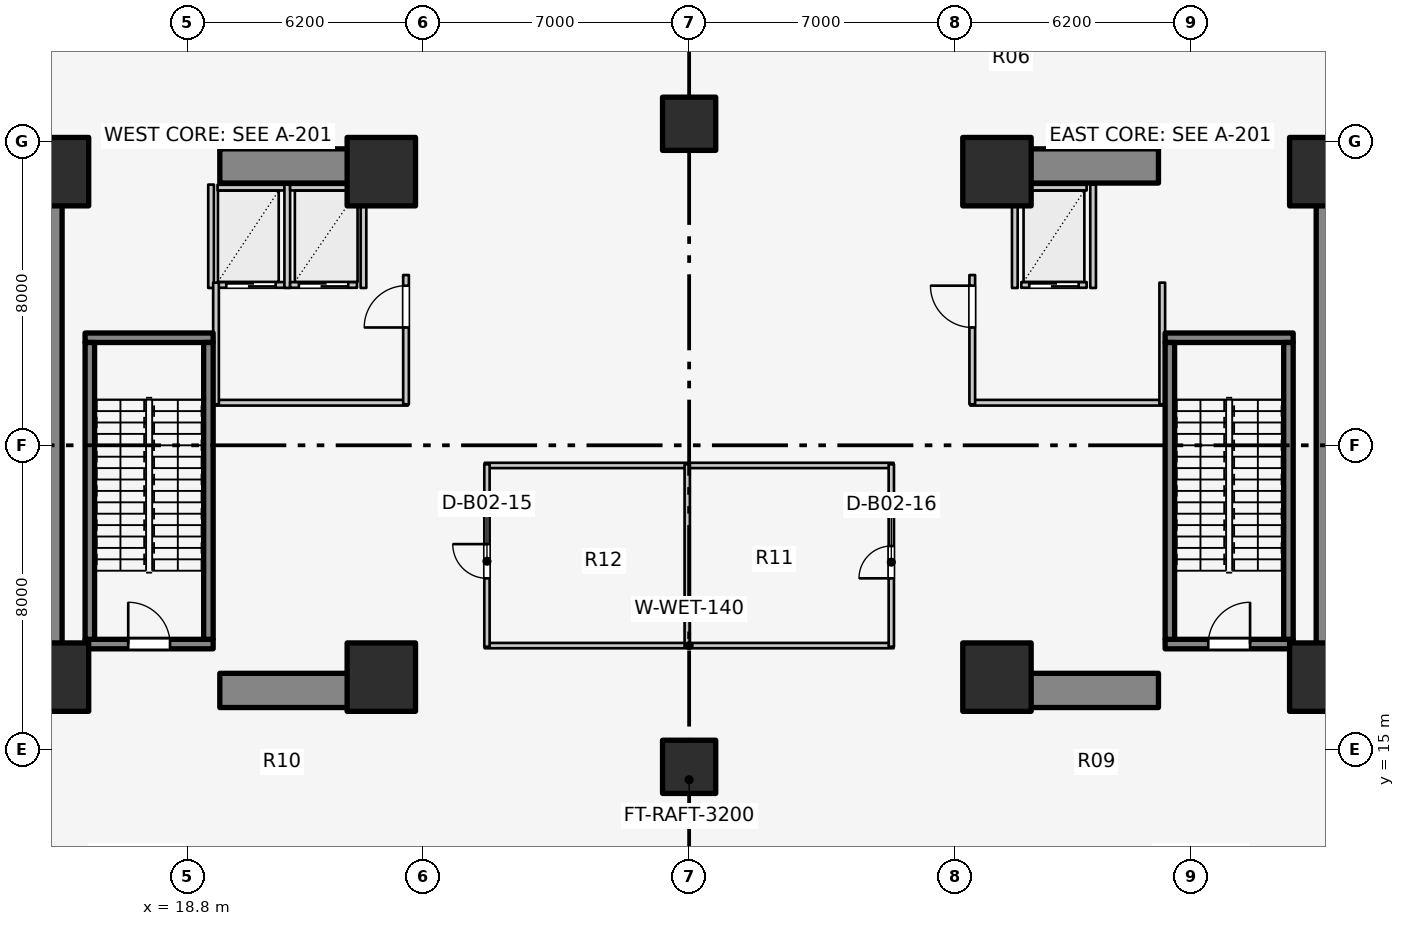
"""IFC4 building model, lengths in metres.
Left out: names, types, materials, properties, quantities, classifications, styles, units other than length and angle.
Written with IfcOpenShell. Run it as: python <this file> out.ifc"""

import sys

from ifc_helpers import new_model, si_unit, direction, frame, frame_2d, origin, origin_2d, place, context, subcontext, project, spatial, rectangle, extrude, element, fill, save


model = new_model("IFC4")
c1 = context("Model", 3, precision=1e-05, world=origin(), true_north=direction((0.0, 1.0)))
c2 = subcontext(c1, "Body", "Model", "MODEL_VIEW")
j1 = project(units=[si_unit("LENGTHUNIT", "METRE"), si_unit("PLANEANGLEUNIT", "RADIAN")], contexts=[c1])
p1 = place(None, origin())
s1 = spatial("IfcSite", under=j1, at=p1, CompositionType="ELEMENT")
p2 = place(p1, origin())
s2 = spatial("IfcBuilding", under=s1, at=p2, CompositionType="ELEMENT")
p3 = place(p2, frame((0.0, 0.0, -10.8)))
s3 = spatial("IfcBuildingStorey", under=s2, at=p3, CompositionType="ELEMENT", Elevation=-10.8)
p4 = place(p3, frame((15.05, 17.05, 0.0), z_axis=(0.0, 0.0, 1.0), x_axis=(0.0, 1.0, 0.0)))
e1 = element("IfcWall", 1, at=p4, inside=s3, PredefinedType="SHEAR", context=c2, shape_type="SweptSolid", body=[
    extrude(rectangle(XDim=12.8, YDim=0.9, at=frame_2d((6.4, 0.0))), origin(), (0.0, 0.0, 1.0), 5.4),
])
for number, where, z_axis, x_axis in (
    (2, (19.65, 16.55, 0.0), (0.0, 0.0, 1.0), (1.0, 0.0, 0.0)),
    (3, (19.65, 30.35, 0.0), (0.0, 0.0, 1.0), (1.0, 0.0, 0.0)),
):
    element("IfcWall", number, at=place(p3, frame(where, z_axis=z_axis, x_axis=x_axis)), inside=s3, PredefinedType="SHEAR", context=c2, shape_type="SweptSolid", body=[
        extrude(rectangle(XDim=4.5, YDim=0.9, at=frame_2d((2.25, 0.0))), origin(), (0.0, 0.0, 1.0), 5.4),
    ])
p5 = place(p3, frame((48.95, 17.05, 0.0), z_axis=(0.0, 0.0, 1.0), x_axis=(0.0, 1.0, 0.0)))
e4 = element("IfcWall", 4, at=p5, inside=s3, PredefinedType="SHEAR", context=c2, shape_type="SweptSolid", body=[
    extrude(rectangle(XDim=12.8, YDim=0.9, at=frame_2d((6.4, 0.0))), origin(), (0.0, 0.0, 1.0), 5.4),
])
for number, where, z_axis, x_axis in (
    (5, (39.85, 16.55, 0.0), (0.0, 0.0, 1.0), (1.0, 0.0, 0.0)),
    (6, (39.85, 30.35, 0.0), (0.0, 0.0, 1.0), (1.0, 0.0, 0.0)),
):
    element("IfcWall", number, at=place(p3, frame(where, z_axis=z_axis, x_axis=x_axis)), inside=s3, PredefinedType="SHEAR", context=c2, shape_type="SweptSolid", body=[
        extrude(rectangle(XDim=4.5, YDim=0.9, at=frame_2d((2.25, 0.0))), origin(), (0.0, 0.0, 1.0), 5.4),
    ])
p6 = place(p3, frame((16.105, 17.77, 0.0), z_axis=(0.0, 0.0, 1.0), x_axis=(1.0, 0.0, 0.0)))
e7 = element("IfcWall", 7, at=p6, inside=s3, PredefinedType="SOLIDWALL", context=c2, shape_type="SweptSolid", body=[
    extrude(rectangle(XDim=3.37, YDim=0.25, at=frame_2d((1.685, 0.0))), origin(), (0.0, 0.0, 1.0), 5.4),
])
p7 = place(p6, frame((1.135, 0.0, 0.0)))
e8 = element("IfcOpeningElement", 8, at=p7, cuts=e7, PredefinedType="OPENING", context=c2, shape_type="SweptSolid", body=[
    extrude(rectangle(XDim=1.1, YDim=2.1, at=frame_2d((0.55, 1.05))), frame((0.0, 0.135, 0.0), z_axis=(0.0, -1.0, 0.0), x_axis=(1.0, 0.0, 0.0)), (0.0, 0.0, 1.0), 0.27),
])
p8 = place(p3, frame((16.105, 25.83, 0.0), z_axis=(0.0, 0.0, 1.0), x_axis=(1.0, 0.0, 0.0)))
e9 = element("IfcWall", 9, at=p8, inside=s3, PredefinedType="SOLIDWALL", context=c2, shape_type="SweptSolid", body=[
    extrude(rectangle(XDim=3.37, YDim=0.25, at=frame_2d((1.685, 0.0))), origin(), (0.0, 0.0, 1.0), 5.4),
])
for number, where, z_axis, x_axis in (
    (10, (16.23, 17.895, 0.0), (0.0, 0.0, 1.0), (0.0, 1.0, 0.0)),
    (11, (19.35, 17.895, 0.0), (0.0, 0.0, 1.0), (0.0, 1.0, 0.0)),
):
    element("IfcWall", number, at=place(p3, frame(where, z_axis=z_axis, x_axis=x_axis)), inside=s3, PredefinedType="SOLIDWALL", context=c2, shape_type="SweptSolid", body=[
        extrude(rectangle(XDim=7.81, YDim=0.25, at=frame_2d((3.905, 0.0))), origin(), (0.0, 0.0, 1.0), 5.4),
    ])
p9 = place(p3, frame((44.525, 17.77, 0.0), z_axis=(0.0, 0.0, 1.0), x_axis=(1.0, 0.0, 0.0)))
e12 = element("IfcWall", 12, at=p9, inside=s3, PredefinedType="SOLIDWALL", context=c2, shape_type="SweptSolid", body=[
    extrude(rectangle(XDim=3.37, YDim=0.25, at=frame_2d((1.685, 0.0))), origin(), (0.0, 0.0, 1.0), 5.4),
])
p10 = place(p9, frame((1.135, 0.0, 0.0)))
e13 = element("IfcOpeningElement", 13, at=p10, cuts=e12, PredefinedType="OPENING", context=c2, shape_type="SweptSolid", body=[
    extrude(rectangle(XDim=1.1, YDim=2.1, at=frame_2d((0.55, 1.05))), frame((0.0, 0.135, 0.0), z_axis=(0.0, -1.0, 0.0), x_axis=(1.0, 0.0, 0.0)), (0.0, 0.0, 1.0), 0.27),
])
p11 = place(p3, frame((44.525, 25.83, 0.0), z_axis=(0.0, 0.0, 1.0), x_axis=(1.0, 0.0, 0.0)))
e14 = element("IfcWall", 14, at=p11, inside=s3, PredefinedType="SOLIDWALL", context=c2, shape_type="SweptSolid", body=[
    extrude(rectangle(XDim=3.37, YDim=0.25, at=frame_2d((1.685, 0.0))), origin(), (0.0, 0.0, 1.0), 5.4),
])
for number, where, z_axis, x_axis in (
    (15, (44.65, 17.895, 0.0), (0.0, 0.0, 1.0), (0.0, 1.0, 0.0)),
    (16, (47.77, 17.895, 0.0), (0.0, 0.0, 1.0), (0.0, 1.0, 0.0)),
):
    element("IfcWall", number, at=place(p3, frame(where, z_axis=z_axis, x_axis=x_axis)), inside=s3, PredefinedType="SOLIDWALL", context=c2, shape_type="SweptSolid", body=[
        extrude(rectangle(XDim=7.81, YDim=0.25, at=frame_2d((3.905, 0.0))), origin(), (0.0, 0.0, 1.0), 5.4),
    ])
for number, where, z_axis, x_axis in (
    (17, (15.3, 16.9, 0.0), (0.0, 0.0, 1.0), (1.0, 0.0, 0.0)),
    (18, (23.9, 16.9, 0.0), (0.0, 0.0, 1.0), (1.0, 0.0, 0.0)),
    (19, (23.9, 30.2, 0.0), (0.0, 0.0, 1.0), (1.0, 0.0, 0.0)),
    (20, (15.3, 30.2, 0.0), (0.0, 0.0, 1.0), (1.0, 0.0, 0.0)),
    (21, (40.1, 16.9, 0.0), (0.0, 0.0, 1.0), (1.0, 0.0, 0.0)),
    (22, (48.7, 16.9, 0.0), (0.0, 0.0, 1.0), (1.0, 0.0, 0.0)),
    (23, (48.7, 30.2, 0.0), (0.0, 0.0, 1.0), (1.0, 0.0, 0.0)),
    (24, (40.1, 30.2, 0.0), (0.0, 0.0, 1.0), (1.0, 0.0, 0.0)),
):
    element("IfcColumn", number, at=place(p3, frame(where, z_axis=z_axis, x_axis=x_axis)), inside=s3, PredefinedType="COLUMN", context=c2, shape_type="SweptSolid", body=[
        extrude(rectangle(XDim=1.8, YDim=1.8, at=origin_2d()), origin(), (0.0, 0.0, 1.0), 5.4),
    ])
for number, where, z_axis, x_axis in (
    (25, (32.0, 14.54, 0.0), (0.0, 0.0, 1.0), (1.0, 0.0, 0.0)),
    (26, (32.0, 31.46, 0.0), (0.0, 0.0, 1.0), (1.0, 0.0, 0.0)),
):
    element("IfcColumn", number, at=place(p3, frame(where, z_axis=z_axis, x_axis=x_axis)), inside=s3, PredefinedType="COLUMN", context=c2, shape_type="SweptSolid", body=[
        extrude(rectangle(XDim=1.4, YDim=1.4, at=origin_2d()), origin(), (0.0, 0.0, 1.0), 5.4),
    ])
p12 = place(p3, frame((19.59, 27.22, 0.0), z_axis=(0.0, 0.0, 1.0), x_axis=(1.0, 0.0, 0.0)))
e27 = element("IfcWall", 27, at=p12, inside=s3, PredefinedType="SOLIDWALL", context=c2, shape_type="SweptSolid", body=[
    extrude(rectangle(XDim=1.76, YDim=0.15, at=frame_2d((0.88, 0.0))), origin(), (0.0, 0.0, 1.0), 5.055),
])
p13 = place(p12, frame((0.23, 0.0, 0.0)))
e28 = element("IfcOpeningElement", 28, at=p13, cuts=e27, PredefinedType="OPENING", context=c2, shape_type="SweptSolid", body=[
    extrude(rectangle(XDim=1.3, YDim=2.1, at=frame_2d((0.65, 1.05))), frame((0.0, 0.085, 0.0), z_axis=(0.0, -1.0, 0.0), x_axis=(1.0, 0.0, 0.0)), (0.0, 0.0, 1.0), 0.17),
])
p14 = place(p3, frame((19.59, 29.78, 0.0), z_axis=(0.0, 0.0, 1.0), x_axis=(1.0, 0.0, 0.0)))
e29 = element("IfcWall", 29, at=p14, inside=s3, PredefinedType="SOLIDWALL", context=c2, shape_type="SweptSolid", body=[
    extrude(rectangle(XDim=1.76, YDim=0.15, at=frame_2d((0.88, 0.0))), origin(), (0.0, 0.0, 1.0), 5.055),
])
for number, where, z_axis, x_axis in (
    (30, (19.42, 27.14, 0.0), (0.0, 0.0, 1.0), (0.0, 1.0, 0.0)),
    (31, (21.425, 27.14, 0.0), (0.0, 0.0, 1.0), (0.0, 1.0, 0.0)),
):
    element("IfcWall", number, at=place(p3, frame(where, z_axis=z_axis, x_axis=x_axis)), inside=s3, PredefinedType="SOLIDWALL", context=c2, shape_type="SweptSolid", body=[
        extrude(rectangle(XDim=2.72, YDim=0.15, at=frame_2d((1.36, 0.0))), origin(), (0.0, 0.0, 1.0), 5.055),
    ])
p15 = place(p3, frame((21.5, 27.22, 0.0), z_axis=(0.0, 0.0, 1.0), x_axis=(1.0, 0.0, 0.0)))
e32 = element("IfcWall", 32, at=p15, inside=s3, PredefinedType="SOLIDWALL", context=c2, shape_type="SweptSolid", body=[
    extrude(rectangle(XDim=1.76, YDim=0.15, at=frame_2d((0.88, 0.0))), origin(), (0.0, 0.0, 1.0), 5.055),
])
p16 = place(p15, frame((0.23, 0.0, 0.0)))
e33 = element("IfcOpeningElement", 33, at=p16, cuts=e32, PredefinedType="OPENING", context=c2, shape_type="SweptSolid", body=[
    extrude(rectangle(XDim=1.3, YDim=2.1, at=frame_2d((0.65, 1.05))), frame((0.0, 0.085, 0.0), z_axis=(0.0, -1.0, 0.0), x_axis=(1.0, 0.0, 0.0)), (0.0, 0.0, 1.0), 0.17),
])
p17 = place(p3, frame((21.5, 29.78, 0.0), z_axis=(0.0, 0.0, 1.0), x_axis=(1.0, 0.0, 0.0)))
e34 = element("IfcWall", 34, at=p17, inside=s3, PredefinedType="SOLIDWALL", context=c2, shape_type="SweptSolid", body=[
    extrude(rectangle(XDim=1.76, YDim=0.15, at=frame_2d((0.88, 0.0))), origin(), (0.0, 0.0, 1.0), 5.055),
])
p18 = place(p3, frame((23.43, 27.14, 0.0), z_axis=(0.0, 0.0, 1.0), x_axis=(0.0, 1.0, 0.0)))
e35 = element("IfcWall", 35, at=p18, inside=s3, PredefinedType="SOLIDWALL", context=c2, shape_type="SweptSolid", body=[
    extrude(rectangle(XDim=2.72, YDim=0.15, at=frame_2d((1.36, 0.0))), origin(), (0.0, 0.0, 1.0), 5.055),
])
p19 = place(p3, frame((40.74, 27.22, 0.0), z_axis=(0.0, 0.0, 1.0), x_axis=(1.0, 0.0, 0.0)))
e36 = element("IfcWall", 36, at=p19, inside=s3, PredefinedType="SOLIDWALL", context=c2, shape_type="SweptSolid", body=[
    extrude(rectangle(XDim=1.72, YDim=0.15, at=frame_2d((0.86, 0.0))), origin(), (0.0, 0.0, 1.0), 5.055),
])
p20 = place(p19, frame((0.21, 0.0, 0.0)))
e37 = element("IfcOpeningElement", 37, at=p20, cuts=e36, PredefinedType="OPENING", context=c2, shape_type="SweptSolid", body=[
    extrude(rectangle(XDim=1.3, YDim=2.1, at=frame_2d((0.65, 1.05))), frame((0.0, 0.085, 0.0), z_axis=(0.0, -1.0, 0.0), x_axis=(1.0, 0.0, 0.0)), (0.0, 0.0, 1.0), 0.17),
])
p21 = place(p3, frame((40.74, 29.78, 0.0), z_axis=(0.0, 0.0, 1.0), x_axis=(1.0, 0.0, 0.0)))
e38 = element("IfcWall", 38, at=p21, inside=s3, PredefinedType="SOLIDWALL", context=c2, shape_type="SweptSolid", body=[
    extrude(rectangle(XDim=1.72, YDim=0.15, at=frame_2d((0.86, 0.0))), origin(), (0.0, 0.0, 1.0), 5.055),
])
for number, where, z_axis, x_axis in (
    (39, (40.57, 27.14, 0.0), (0.0, 0.0, 1.0), (0.0, 1.0, 0.0)),
    (40, (42.63, 27.14, 0.0), (0.0, 0.0, 1.0), (0.0, 1.0, 0.0)),
):
    element("IfcWall", number, at=place(p3, frame(where, z_axis=z_axis, x_axis=x_axis)), inside=s3, PredefinedType="SOLIDWALL", context=c2, shape_type="SweptSolid", body=[
        extrude(rectangle(XDim=2.72, YDim=0.15, at=frame_2d((1.36, 0.0))), origin(), (0.0, 0.0, 1.0), 5.055),
    ])
p22 = place(p3, frame((19.52, 24.12, 0.0), z_axis=(0.0, 0.0, 1.0), x_axis=(1.0, 0.0, 0.0)))
e41 = element("IfcWall", 41, at=p22, inside=s3, PredefinedType="PARTITIONING", context=c2, shape_type="SweptSolid", body=[
    extrude(rectangle(XDim=5.08, YDim=0.15, at=frame_2d((2.54, 0.0))), origin(), (0.0, 0.0, 1.0), 4.42),
])
p23 = place(p3, frame((19.55, 24.08, 0.0), z_axis=(0.0, 0.0, 1.0), x_axis=(0.0, 1.0, 0.0)))
e42 = element("IfcWall", 42, at=p23, inside=s3, PredefinedType="PARTITIONING", context=c2, shape_type="SweptSolid", body=[
    extrude(rectangle(XDim=3.2, YDim=0.15, at=frame_2d((1.6, 0.0))), origin(), (0.0, 0.0, 1.0), 5.055),
])
p24 = place(p3, frame((24.55, 24.08, 0.0), z_axis=(0.0, 0.0, 1.0), x_axis=(0.0, 1.0, 0.0)))
e43 = element("IfcWall", 43, at=p24, inside=s3, PredefinedType="PARTITIONING", context=c2, shape_type="SweptSolid", body=[
    extrude(rectangle(XDim=3.4, YDim=0.15, at=frame_2d((1.7, 0.0))), origin(), (0.0, 0.0, 1.0), 5.055),
])
p25 = place(p24, frame((2.02, 0.0, 0.0)))
e44 = element("IfcOpeningElement", 44, at=p25, cuts=e43, PredefinedType="OPENING", context=c2, shape_type="SweptSolid", body=[
    extrude(rectangle(XDim=1.1, YDim=2.1, at=frame_2d((0.55, 1.05))), frame((0.0, 0.085, 0.0), z_axis=(0.0, -1.0, 0.0), x_axis=(1.0, 0.0, 0.0)), (0.0, 0.0, 1.0), 0.17),
])
p26 = place(p3, frame((39.4, 24.12, 0.0), z_axis=(0.0, 0.0, 1.0), x_axis=(1.0, 0.0, 0.0)))
e45 = element("IfcWall", 45, at=p26, inside=s3, PredefinedType="PARTITIONING", context=c2, shape_type="SweptSolid", body=[
    extrude(rectangle(XDim=5.08, YDim=0.15, at=frame_2d((2.54, 0.0))), origin(), (0.0, 0.0, 1.0), 4.42),
])
p27 = place(p3, frame((44.45, 24.08, 0.0), z_axis=(0.0, 0.0, 1.0), x_axis=(0.0, 1.0, 0.0)))
e46 = element("IfcWall", 46, at=p27, inside=s3, PredefinedType="PARTITIONING", context=c2, shape_type="SweptSolid", body=[
    extrude(rectangle(XDim=3.2, YDim=0.15, at=frame_2d((1.6, 0.0))), origin(), (0.0, 0.0, 1.0), 5.055),
])
p28 = place(p3, frame((39.45, 24.08, 0.0), z_axis=(0.0, 0.0, 1.0), x_axis=(0.0, 1.0, 0.0)))
e47 = element("IfcWall", 47, at=p28, inside=s3, PredefinedType="PARTITIONING", context=c2, shape_type="SweptSolid", body=[
    extrude(rectangle(XDim=3.4, YDim=0.15, at=frame_2d((1.7, 0.0))), origin(), (0.0, 0.0, 1.0), 5.055),
])
p29 = place(p28, frame((2.02, 0.0, 0.0)))
e48 = element("IfcOpeningElement", 48, at=p29, cuts=e47, PredefinedType="OPENING", context=c2, shape_type="SweptSolid", body=[
    extrude(rectangle(XDim=1.1, YDim=2.1, at=frame_2d((0.55, 1.05))), frame((0.0, 0.085, 0.0), z_axis=(0.0, -1.0, 0.0), x_axis=(1.0, 0.0, 0.0)), (0.0, 0.0, 1.0), 0.17),
])
for number, where, z_axis, x_axis in (
    (49, (26.62, 17.73, 0.0), (0.0, 0.0, 1.0), (1.0, 0.0, 0.0)),
    (50, (26.62, 22.47, 0.0), (0.0, 0.0, 1.0), (1.0, 0.0, 0.0)),
):
    element("IfcWall", number, at=place(p3, frame(where, z_axis=z_axis, x_axis=x_axis)), inside=s3, PredefinedType="PLUMBINGWALL", context=c2, shape_type="SweptSolid", body=[
        extrude(rectangle(XDim=10.76, YDim=0.14, at=frame_2d((5.38, 0.0))), origin(), (0.0, 0.0, 1.0), 5.055),
    ])
p30 = place(p3, frame((31.95, 17.7, 0.0), z_axis=(0.0, 0.0, 1.0), x_axis=(0.0, 1.0, 0.0)))
e51 = element("IfcWall", 51, at=p30, inside=s3, PredefinedType="PLUMBINGWALL", context=c2, shape_type="SweptSolid", body=[
    extrude(rectangle(XDim=4.8, YDim=0.14, at=frame_2d((2.4, 0.0))), origin(), (0.0, 0.0, 1.0), 5.055),
])
p31 = place(p3, frame((26.68, 17.7, 0.0), z_axis=(0.0, 0.0, 1.0), x_axis=(0.0, 1.0, 0.0)))
e52 = element("IfcWall", 52, at=p31, inside=s3, PredefinedType="PLUMBINGWALL", context=c2, shape_type="SweptSolid", body=[
    extrude(rectangle(XDim=4.8, YDim=0.14, at=frame_2d((2.4, 0.0))), origin(), (0.0, 0.0, 1.0), 5.055),
])
p32 = place(p31, frame((1.8, 0.0, 0.0)))
e53 = element("IfcOpeningElement", 53, at=p32, cuts=e52, PredefinedType="OPENING", context=c2, shape_type="SweptSolid", body=[
    extrude(rectangle(XDim=0.9, YDim=2.1, at=frame_2d((0.45, 1.05))), frame((0.0, 0.08, 0.0), z_axis=(0.0, -1.0, 0.0), x_axis=(1.0, 0.0, 0.0)), (0.0, 0.0, 1.0), 0.16),
])
p33 = place(p3, frame((37.32, 17.7, 0.0), z_axis=(0.0, 0.0, 1.0), x_axis=(0.0, 1.0, 0.0)))
e54 = element("IfcWall", 54, at=p33, inside=s3, PredefinedType="PLUMBINGWALL", context=c2, shape_type="SweptSolid", body=[
    extrude(rectangle(XDim=4.8, YDim=0.14, at=frame_2d((2.4, 0.0))), origin(), (0.0, 0.0, 1.0), 5.055),
])
p34 = place(p33, frame((1.8, 0.0, 0.0)))
e55 = element("IfcOpeningElement", 55, at=p34, cuts=e54, PredefinedType="OPENING", context=c2, shape_type="SweptSolid", body=[
    extrude(rectangle(XDim=0.85, YDim=2.05, at=frame_2d((0.425, 1.025))), frame((0.0, 0.08, 0.0), z_axis=(0.0, -1.0, 0.0), x_axis=(1.0, 0.0, 0.0)), (0.0, 0.0, 1.0), 0.16),
])
p35 = place(p7, origin())
e56 = element("IfcDoor", 56, at=p35, inside=s3, OperationType="SINGLE_SWING_LEFT", PredefinedType="DOOR", context=c2, shape_type="SweptSolid", body=[
    extrude(rectangle(XDim=1.1, YDim=2.1, at=frame_2d((0.55, 1.05))), frame((0.0, 0.025, 0.0), z_axis=(0.0, -1.0, 0.0), x_axis=(1.0, 0.0, 0.0)), (0.0, 0.0, 1.0), 0.05),
])
fill(e8, e56)
p36 = place(p10, origin())
e57 = element("IfcDoor", 57, at=p36, inside=s3, OperationType="SINGLE_SWING_RIGHT", PredefinedType="DOOR", context=c2, shape_type="SweptSolid", body=[
    extrude(rectangle(XDim=1.1, YDim=2.1, at=frame_2d((0.55, 1.05))), frame((0.0, 0.025, 0.0), z_axis=(0.0, -1.0, 0.0), x_axis=(1.0, 0.0, 0.0)), (0.0, 0.0, 1.0), 0.05),
])
fill(e13, e57)
p37 = place(p13, origin())
e58 = element("IfcDoor", 58, at=p37, inside=s3, OperationType="DOUBLE_DOOR_SLIDING", PredefinedType="DOOR", context=c2, shape_type="SweptSolid", body=[
    extrude(rectangle(XDim=1.3, YDim=2.1, at=frame_2d((0.65, 1.05))), frame((0.0, 0.025, 0.0), z_axis=(0.0, -1.0, 0.0), x_axis=(1.0, 0.0, 0.0)), (0.0, 0.0, 1.0), 0.05),
])
fill(e28, e58)
p38 = place(p16, origin())
e59 = element("IfcDoor", 59, at=p38, inside=s3, OperationType="DOUBLE_DOOR_SLIDING", PredefinedType="DOOR", context=c2, shape_type="SweptSolid", body=[
    extrude(rectangle(XDim=1.3, YDim=2.1, at=frame_2d((0.65, 1.05))), frame((0.0, 0.025, 0.0), z_axis=(0.0, -1.0, 0.0), x_axis=(1.0, 0.0, 0.0)), (0.0, 0.0, 1.0), 0.05),
])
fill(e33, e59)
p39 = place(p20, origin())
e60 = element("IfcDoor", 60, at=p39, inside=s3, OperationType="DOUBLE_DOOR_SLIDING", PredefinedType="DOOR", context=c2, shape_type="SweptSolid", body=[
    extrude(rectangle(XDim=1.3, YDim=2.1, at=frame_2d((0.65, 1.05))), frame((0.0, 0.025, 0.0), z_axis=(0.0, -1.0, 0.0), x_axis=(1.0, 0.0, 0.0)), (0.0, 0.0, 1.0), 0.05),
])
fill(e37, e60)
p40 = place(p25, origin())
e61 = element("IfcDoor", 61, at=p40, inside=s3, OperationType="SINGLE_SWING_LEFT", PredefinedType="DOOR", context=c2, shape_type="SweptSolid", body=[
    extrude(rectangle(XDim=1.1, YDim=2.1, at=frame_2d((0.55, 1.05))), frame((0.0, 0.025, 0.0), z_axis=(0.0, -1.0, 0.0), x_axis=(1.0, 0.0, 0.0)), (0.0, 0.0, 1.0), 0.05),
])
fill(e44, e61)
p41 = place(p29, origin())
e62 = element("IfcDoor", 62, at=p41, inside=s3, OperationType="SINGLE_SWING_RIGHT", PredefinedType="DOOR", context=c2, shape_type="SweptSolid", body=[
    extrude(rectangle(XDim=1.1, YDim=2.1, at=frame_2d((0.55, 1.05))), frame((0.0, 0.025, 0.0), z_axis=(0.0, -1.0, 0.0), x_axis=(1.0, 0.0, 0.0)), (0.0, 0.0, 1.0), 0.05),
])
fill(e48, e62)
p42 = place(p32, origin())
e63 = element("IfcDoor", 63, at=p42, inside=s3, OperationType="SINGLE_SWING_RIGHT", PredefinedType="DOOR", context=c2, shape_type="SweptSolid", body=[
    extrude(rectangle(XDim=0.9, YDim=2.1, at=frame_2d((0.45, 1.05))), frame((0.0, 0.025, 0.0), z_axis=(0.0, -1.0, 0.0), x_axis=(1.0, 0.0, 0.0)), (0.0, 0.0, 1.0), 0.05),
])
fill(e53, e63)
p43 = place(p34, origin())
e64 = element("IfcDoor", 64, at=p43, inside=s3, OperationType="SINGLE_SWING_LEFT", PredefinedType="DOOR", context=c2, shape_type="SweptSolid", body=[
    extrude(rectangle(XDim=0.85, YDim=2.05, at=frame_2d((0.425, 1.025))), frame((0.0, 0.025, 0.0), z_axis=(0.0, -1.0, 0.0), x_axis=(1.0, 0.0, 0.0)), (0.0, 0.0, 1.0), 0.05),
])
fill(e55, e64)
save(model, sys.argv[1])
